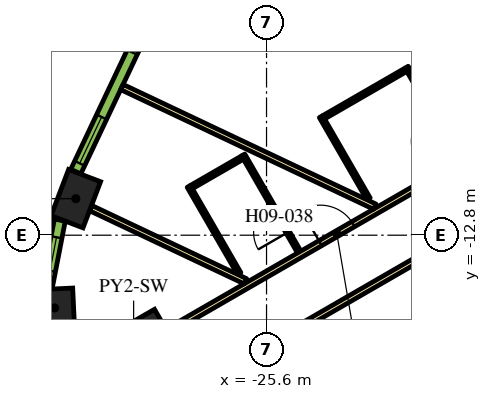
"""IFC4 building model, lengths in metres.
Left out: names, types, materials, properties, quantities, classifications, styles, units other than length and angle.
Written with IfcOpenShell. Run it as: python <this file> out.ifc"""

import sys

from ifc_helpers import new_model, si_unit, direction, frame, frame_2d, origin, origin_2d, place, context, subcontext, project, spatial, rectangle, extrude, element, fill, save


model = new_model("IFC4")
c1 = context("Model", 3, precision=1e-05, world=origin(), true_north=direction((0.0, 1.0)))
c2 = subcontext(c1, "Body", "Model", "MODEL_VIEW")
j1 = project(units=[si_unit("LENGTHUNIT", "METRE"), si_unit("PLANEANGLEUNIT", "RADIAN")], contexts=[c1])
p1 = place(None, origin())
s1 = spatial("IfcSite", under=j1, at=p1, CompositionType="ELEMENT")
p2 = place(p1, origin())
s2 = spatial("IfcBuilding", under=s1, at=p2, CompositionType="ELEMENT")
p3 = place(p2, frame((0.0, 0.0, 122.7)))
s3 = spatial("IfcBuildingStorey", under=s2, at=p3, CompositionType="ELEMENT", Elevation=122.7)
p4 = place(p3, frame((-29.097, -16.799, 0.0), z_axis=(0.0, 0.0, 1.0), x_axis=(-0.866025403784, -0.5, 0.0)))
e1 = element("IfcColumn", 1, at=p4, inside=s3, PredefinedType="COLUMN", context=c2, shape_type="SweptSolid", body=[
    extrude(rectangle(XDim=3.0, YDim=3.0, at=origin_2d()), origin(), (0.0, 0.0, 1.0), 3.9),
])
p5 = place(p3, frame((-30.619, -11.839, 0.0), z_axis=(0.0, 0.0, 1.0), x_axis=(-0.355493616145, -0.934678708905, 0.0)))
e2 = element("IfcColumn", 2, at=p5, inside=s3, PredefinedType="COLUMN", context=c2, shape_type="SweptSolid", body=[
    extrude(rectangle(XDim=1.3, YDim=0.9, at=origin_2d()), origin(), (0.0, 0.0, 1.0), 3.9),
])
p6 = place(p3, frame((-31.177, -14.714, 0.0), z_axis=(0.0, 0.0, 1.0), x_axis=(0.046756026083, -0.998906338965, 0.0)))
e3 = element("IfcColumn", 3, at=p6, inside=s3, PredefinedType="COLUMN", context=c2, shape_type="SweptSolid", body=[
    extrude(rectangle(XDim=1.0, YDim=1.0, at=origin_2d()), origin(), (0.0, 0.0, 1.0), 3.9),
])
p7 = place(p3, frame((-28.211, -15.335, 0.0), z_axis=(0.0, 0.0, 1.0), x_axis=(0.866025884867, 0.49999916674, 0.0)))
e4 = element("IfcWall", 4, at=p7, inside=s3, PredefinedType="PARTITIONING", context=c2, shape_type="SweptSolid", body=[
    extrude(rectangle(XDim=13.543, YDim=0.15, at=frame_2d((6.772, 0.0))), origin(), (0.0, 0.0, 1.0), 2.75),
])
p8 = place(p7, frame((12.114, 0.0, 0.0)))
e5 = element("IfcOpeningElement", 5, at=p8, cuts=e4, PredefinedType="OPENING", context=c2, shape_type="SweptSolid", body=[
    extrude(rectangle(XDim=1.1, YDim=2.1, at=frame_2d((0.55, 1.05))), frame((0.0, 0.085, 0.0), z_axis=(0.0, -1.0, 0.0), x_axis=(1.0, 0.0, 0.0)), (0.0, 0.0, 1.0), 0.17),
])
p9 = place(p7, frame((4.65, 0.0, 0.0)))
e6 = element("IfcOpeningElement", 6, at=p9, cuts=e4, PredefinedType="OPENING", context=c2, shape_type="SweptSolid", body=[
    extrude(rectangle(XDim=1.0, YDim=2.1, at=frame_2d((0.5, 1.05))), frame((0.0, 0.085, 0.0), z_axis=(0.0, -1.0, 0.0), x_axis=(1.0, 0.0, 0.0)), (0.0, 0.0, 1.0), 0.17),
])
p10 = place(p3, frame((-15.587, -9.952, 0.0), z_axis=(0.0, 0.0, 1.0), x_axis=(-0.866017869832, -0.500013048961, 0.0)))
e7 = element("IfcWall", 7, at=p10, inside=s3, PredefinedType="PARTITIONING", context=c2, shape_type="SweptSolid", body=[
    extrude(rectangle(XDim=13.624, YDim=0.15, at=frame_2d((6.812, 0.0))), origin(), (0.0, 0.0, 1.0), 2.75),
])
p11 = place(p10, frame((12.344, 0.0, 0.0)))
e8 = element("IfcOpeningElement", 8, at=p11, cuts=e7, PredefinedType="OPENING", context=c2, shape_type="SweptSolid", body=[
    extrude(rectangle(XDim=1.1, YDim=2.1, at=frame_2d((0.55, 1.05))), frame((0.0, 0.085, 0.0), z_axis=(0.0, -1.0, 0.0), x_axis=(1.0, 0.0, 0.0)), (0.0, 0.0, 1.0), 0.17),
])
p12 = place(p3, frame((-30.231, -12.085, 0.0), z_axis=(0.0, 0.0, 1.0), x_axis=(0.904001132572, -0.427530060122, 0.0)))
e9 = element("IfcWall", 9, at=p12, inside=s3, PredefinedType="PARTITIONING", context=c2, shape_type="SweptSolid", body=[
    extrude(rectangle(XDim=4.51, YDim=0.15, at=frame_2d((2.255, 0.0))), origin(), (0.0, 0.0, 1.0), 2.75),
])
p13 = place(p3, frame((-29.406, -8.901, 0.0), z_axis=(0.0, 0.0, 1.0), x_axis=(0.904002363742, -0.427527456836, 0.0)))
e10 = element("IfcWall", 10, at=p13, inside=s3, PredefinedType="PARTITIONING", context=c2, shape_type="SweptSolid", body=[
    extrude(rectangle(XDim=7.362, YDim=0.15, at=frame_2d((3.681, 0.0))), origin(), (0.0, 0.0, 1.0), 2.75),
])
p14 = place(p3, frame((-26.591, -3.122, 0.0), z_axis=(0.0, 0.0, 1.0), x_axis=(0.893766213273, -0.448533115847, 0.0)))
e11 = element("IfcWall", 11, at=p14, inside=s3, PredefinedType="PARTITIONING", context=c2, shape_type="SweptSolid", body=[
    extrude(rectangle(XDim=10.875, YDim=0.15, at=frame_2d((5.438, 0.0))), origin(), (0.0, 0.0, 1.0), 2.75),
])
p15 = place(p3, frame((-20.515, -10.805, 0.0), z_axis=(0.0, 0.0, 1.0), x_axis=(-0.49994636267, 0.866056369097, 0.0)))
e12 = element("IfcWall", 12, at=p15, inside=s3, PredefinedType="PARTITIONING", context=c2, shape_type="SweptSolid", body=[
    extrude(rectangle(XDim=2.8, YDim=0.1, at=frame_2d((1.4, 0.0))), origin(), (0.0, 0.0, 1.0), 2.75),
])
p16 = place(p15, frame((0.55, 0.0, 0.0)))
e13 = element("IfcOpeningElement", 13, at=p16, cuts=e12, PredefinedType="OPENING", context=c2, shape_type="SweptSolid", body=[
    extrude(rectangle(XDim=1.0, YDim=2.1, at=frame_2d((0.5, 1.05))), frame((0.0, 0.06, 0.0), z_axis=(0.0, -1.0, 0.0), x_axis=(1.0, 0.0, 0.0)), (0.0, 0.0, 1.0), 0.12),
])
for number, where, z_axis, x_axis in (
    (14, (-21.933, -8.448, 0.0), (0.0, 0.0, 1.0), (-0.866, -0.5, 0.0)),
    (15, (-22.916, -11.845, 0.0), (0.0, 0.0, 1.0), (-0.5, 0.866, 0.0)),
):
    element("IfcWall", number, at=place(p3, frame(where, z_axis=z_axis, x_axis=x_axis)), inside=s3, PredefinedType="PARTITIONING", context=c2, shape_type="SweptSolid", body=[
        extrude(rectangle(XDim=2.5, YDim=0.1, at=frame_2d((1.25, 0.0))), origin(), (0.0, 0.0, 1.0), 2.75),
    ])
p17 = place(p3, frame((-24.74, -13.244, 0.0), z_axis=(0.0, 0.0, 1.0), x_axis=(-0.500037662692, 0.866003658127, 0.0)))
e16 = element("IfcWall", 16, at=p17, inside=s3, PredefinedType="PARTITIONING", context=c2, shape_type="SweptSolid", body=[
    extrude(rectangle(XDim=2.95, YDim=0.1, at=frame_2d((1.475, 0.0))), origin(), (0.0, 0.0, 1.0), 2.75),
])
p18 = place(p17, frame((0.6, 0.0, 0.0)))
e17 = element("IfcOpeningElement", 17, at=p18, cuts=e16, PredefinedType="OPENING", context=c2, shape_type="SweptSolid", body=[
    extrude(rectangle(XDim=0.9, YDim=2.1, at=frame_2d((0.45, 1.05))), frame((0.0, 0.06, 0.0), z_axis=(0.0, -1.0, 0.0), x_axis=(1.0, 0.0, 0.0)), (0.0, 0.0, 1.0), 0.12),
])
p19 = place(p3, frame((-26.233, -10.758, 0.0), z_axis=(0.0, 0.0, 1.0), x_axis=(-0.866043940782, -0.499967891604, 0.0)))
e18 = element("IfcWall", 18, at=p19, inside=s3, PredefinedType="PARTITIONING", context=c2, shape_type="SweptSolid", body=[
    extrude(rectangle(XDim=1.55, YDim=0.1, at=frame_2d((0.775, 0.0))), origin(), (0.0, 0.0, 1.0), 2.75),
])
p20 = place(p3, frame((-26.319, -13.81, 0.0), z_axis=(0.0, 0.0, 1.0), x_axis=(-0.499953715521, 0.866052124492, 0.0)))
e19 = element("IfcWall", 19, at=p20, inside=s3, PredefinedType="PARTITIONING", context=c2, shape_type="SweptSolid", body=[
    extrude(rectangle(XDim=2.65, YDim=0.1, at=frame_2d((1.325, 0.0))), origin(), (0.0, 0.0, 1.0), 2.75),
])
p21 = place(p3, frame((-28.436, -6.511, 0.0), z_axis=(0.0, 0.0, 1.0), x_axis=(-0.427543726596, -0.903994669148, 0.0)))
e20 = element("IfcWall", 20, at=p21, inside=s3, PredefinedType="SOLIDWALL", context=c2, shape_type="SweptSolid", body=[
    extrude(rectangle(XDim=5.107, YDim=0.29, at=frame_2d((2.553, 0.0))), origin(), (0.0, 0.0, 1.0), 3.65),
])
p22 = place(p21, frame((0.285, 0.0, 0.9)))
e21 = element("IfcOpeningElement", 21, at=p22, cuts=e20, PredefinedType="OPENING", context=c2, shape_type="SweptSolid", body=[
    extrude(rectangle(XDim=1.35, YDim=2.15, at=frame_2d((0.675, 1.075))), frame((0.0, 0.155, 0.0), z_axis=(0.0, -1.0, 0.0), x_axis=(1.0, 0.0, 0.0)), (0.0, 0.0, 1.0), 0.31),
])
p23 = place(p21, frame((3.516, 0.0, 0.9)))
e22 = element("IfcOpeningElement", 22, at=p23, cuts=e20, PredefinedType="OPENING", context=c2, shape_type="SweptSolid", body=[
    extrude(rectangle(XDim=1.35, YDim=2.15, at=frame_2d((0.675, 1.075))), frame((0.0, 0.155, 0.0), z_axis=(0.0, -1.0, 0.0), x_axis=(1.0, 0.0, 0.0)), (0.0, 0.0, 1.0), 0.31),
])
p24 = place(p3, frame((-31.039, -12.403, 0.0), z_axis=(0.0, 0.0, 1.0), x_axis=(-0.190409913989, -0.981704672829, 0.0)))
e23 = element("IfcWall", 23, at=p24, inside=s3, PredefinedType="SOLIDWALL", context=c2, shape_type="SweptSolid", body=[
    extrude(rectangle(XDim=1.819, YDim=0.29, at=frame_2d((0.91, 0.0))), origin(), (0.0, 0.0, 1.0), 3.65),
])
p25 = place(p24, frame((0.46, 0.0, 0.9)))
e24 = element("IfcOpeningElement", 24, at=p25, cuts=e23, PredefinedType="OPENING", context=c2, shape_type="SweptSolid", body=[
    extrude(rectangle(XDim=0.9, YDim=2.15, at=frame_2d((0.45, 1.075))), frame((0.0, 0.155, 0.0), z_axis=(0.0, -1.0, 0.0), x_axis=(1.0, 0.0, 0.0)), (0.0, 0.0, 1.0), 0.31),
])
p26 = place(p9, origin())
e25 = element("IfcDoor", 25, at=p26, inside=s3, OperationType="SINGLE_SWING_RIGHT", PredefinedType="DOOR", context=c2, shape_type="SweptSolid", body=[
    extrude(rectangle(XDim=1.0, YDim=2.1, at=frame_2d((0.5, 1.05))), frame((0.0, 0.025, 0.0), z_axis=(0.0, -1.0, 0.0), x_axis=(1.0, 0.0, 0.0)), (0.0, 0.0, 1.0), 0.05),
])
fill(e6, e25)
p27 = place(p18, origin())
e26 = element("IfcDoor", 26, at=p27, inside=s3, OperationType="SINGLE_SWING_LEFT", PredefinedType="DOOR", context=c2, shape_type="SweptSolid", body=[
    extrude(rectangle(XDim=0.9, YDim=2.1, at=frame_2d((0.45, 1.05))), frame((0.0, 0.025, 0.0), z_axis=(0.0, -1.0, 0.0), x_axis=(1.0, 0.0, 0.0)), (0.0, 0.0, 1.0), 0.05),
])
fill(e17, e26)
p28 = place(p22, origin())
e27 = element("IfcWindow", 27, at=p28, inside=s3, PartitioningType="DOUBLE_PANEL_VERTICAL", PredefinedType="WINDOW", context=c2, shape_type="SweptSolid", body=[
    extrude(rectangle(XDim=1.35, YDim=2.15, at=frame_2d((0.675, 1.075))), frame((0.0, 0.015, 0.0), z_axis=(0.0, -1.0, 0.0), x_axis=(1.0, 0.0, 0.0)), (0.0, 0.0, 1.0), 0.06),
])
fill(e21, e27)
p29 = place(p23, origin())
e28 = element("IfcWindow", 28, at=p29, inside=s3, PartitioningType="DOUBLE_PANEL_VERTICAL", PredefinedType="WINDOW", context=c2, shape_type="SweptSolid", body=[
    extrude(rectangle(XDim=1.35, YDim=2.15, at=frame_2d((0.675, 1.075))), frame((0.0, 0.015, 0.0), z_axis=(0.0, -1.0, 0.0), x_axis=(1.0, 0.0, 0.0)), (0.0, 0.0, 1.0), 0.06),
])
fill(e22, e28)
p30 = place(p25, origin())
e29 = element("IfcWindow", 29, at=p30, inside=s3, PartitioningType="SINGLE_PANEL", PredefinedType="WINDOW", context=c2, shape_type="SweptSolid", body=[
    extrude(rectangle(XDim=0.9, YDim=2.15, at=frame_2d((0.45, 1.075))), frame((0.0, 0.015, 0.0), z_axis=(0.0, -1.0, 0.0), x_axis=(1.0, 0.0, 0.0)), (0.0, 0.0, 1.0), 0.06),
])
fill(e24, e29)
save(model, sys.argv[1])
